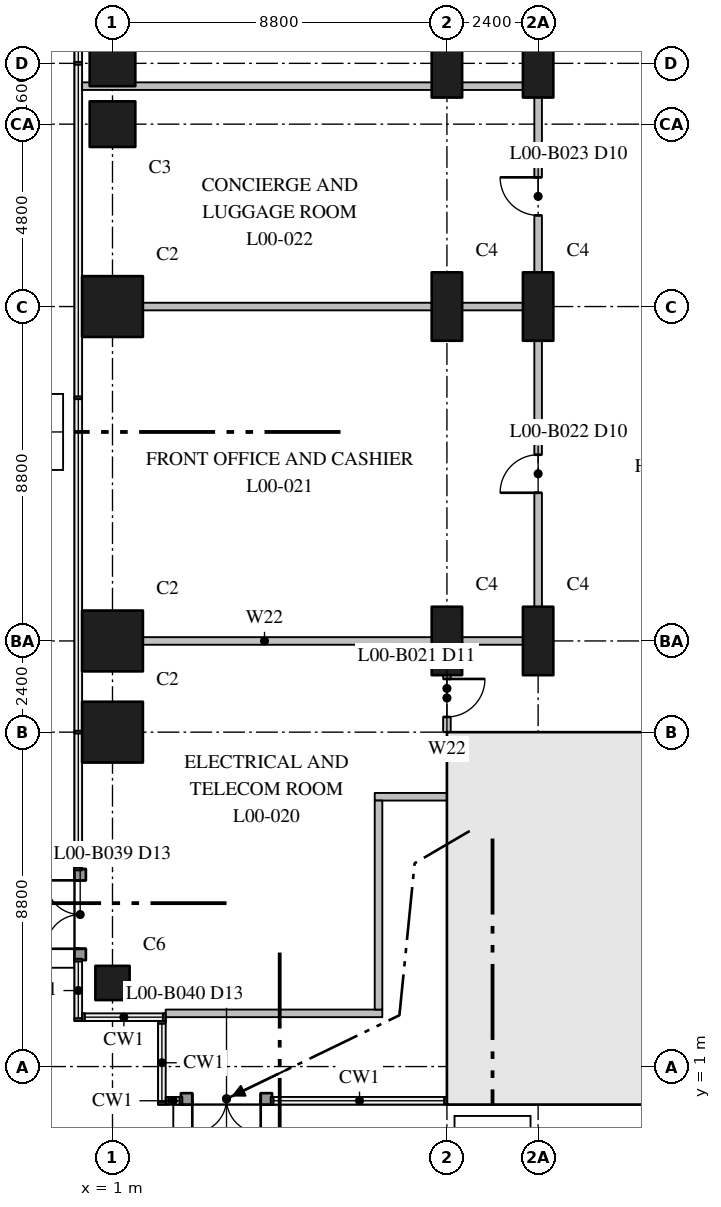
"""IFC4 building model, lengths in metres.
Left out: names, types, materials, properties, quantities, classifications, styles, units other than length and angle.
Written with IfcOpenShell. Run it as: python <this file> out.ifc"""

import sys

from ifc_helpers import new_model, si_unit, direction, frame, frame_2d, origin, origin_2d, place, context, subcontext, project, spatial, rectangle, extrude, element, fill, save


model = new_model("IFC4")
c1 = context("Model", 3, precision=1e-05, world=origin(), true_north=direction((0.0, 1.0)))
c2 = subcontext(c1, "Body", "Model", "MODEL_VIEW")
j1 = project(units=[si_unit("LENGTHUNIT", "METRE"), si_unit("PLANEANGLEUNIT", "RADIAN")], contexts=[c1])
p1 = place(None, origin())
s1 = spatial("IfcSite", under=j1, at=p1, CompositionType="ELEMENT")
p2 = place(p1, origin())
s2 = spatial("IfcBuilding", under=s1, at=p2, CompositionType="ELEMENT")
p3 = place(p2, origin())
s3 = spatial("IfcBuildingStorey", under=s2, at=p3, CompositionType="ELEMENT", Elevation=0.0)
p4 = place(p3, frame((1.0, 3.2, 0.0), z_axis=(0.0, 0.0, 1.0), x_axis=(1.0, 0.0, 0.0)))
e1 = element("IfcColumn", 1, at=p4, inside=s3, PredefinedType="COLUMN", context=c2, shape_type="SweptSolid", body=[
    extrude(rectangle(XDim=0.9, YDim=0.9, at=origin_2d()), origin(), (0.0, 0.0, 1.0), 7.5),
])
for number, where, z_axis, x_axis in (
    (2, (1.0, 9.8, 0.0), (0.0, 0.0, 1.0), (1.0, 0.0, 0.0)),
    (3, (1.0, 12.2, 0.0), (0.0, 0.0, 1.0), (1.0, 0.0, 0.0)),
    (4, (1.0, 21.0, 0.0), (0.0, 0.0, 1.0), (1.0, 0.0, 0.0)),
):
    element("IfcColumn", number, at=place(p3, frame(where, z_axis=z_axis, x_axis=x_axis)), inside=s3, PredefinedType="COLUMN", context=c2, shape_type="SweptSolid", body=[
        extrude(rectangle(XDim=1.6, YDim=1.6, at=origin_2d()), origin(), (0.0, 0.0, 1.0), 7.5),
    ])
for number, where, z_axis, x_axis in (
    (5, (1.0, 25.8, 0.0), (0.0, 0.0, 1.0), (1.0, 0.0, 0.0)),
    (6, (1.0, 27.4, 0.0), (0.0, 0.0, 1.0), (1.0, 0.0, 0.0)),
):
    element("IfcColumn", number, at=place(p3, frame(where, z_axis=z_axis, x_axis=x_axis)), inside=s3, PredefinedType="COLUMN", context=c2, shape_type="SweptSolid", body=[
        extrude(rectangle(XDim=1.2, YDim=1.2, at=origin_2d()), origin(), (0.0, 0.0, 1.0), 7.5),
    ])
for number, where, z_axis, x_axis in (
    (7, (9.8, 12.2, 0.0), (0.0, 0.0, 1.0), (0.0, 1.0, 0.0)),
    (8, (9.8, 21.0, 0.0), (0.0, 0.0, 1.0), (0.0, 1.0, 0.0)),
    (9, (9.8, 27.4, 0.0), (0.0, 0.0, 1.0), (0.0, 1.0, 0.0)),
    (10, (12.2, 12.2, 0.0), (0.0, 0.0, 1.0), (0.0, 1.0, 0.0)),
    (11, (12.2, 21.0, 0.0), (0.0, 0.0, 1.0), (0.0, 1.0, 0.0)),
    (12, (12.2, 27.4, 0.0), (0.0, 0.0, 1.0), (0.0, 1.0, 0.0)),
):
    element("IfcColumn", number, at=place(p3, frame(where, z_axis=z_axis, x_axis=x_axis)), inside=s3, PredefinedType="COLUMN", context=c2, shape_type="SweptSolid", body=[
        extrude(rectangle(XDim=1.8, YDim=0.8, at=origin_2d()), origin(), (0.0, 0.0, 1.0), 7.5),
    ])
p5 = place(p3, frame((9.8, 0.6, 0.0), z_axis=(0.0, 0.0, 1.0), x_axis=(1.0, 0.0, 0.0)))
e13 = element("IfcWall", 13, at=p5, inside=s3, PredefinedType="SHEAR", context=c2, shape_type="SweptSolid", body=[
    extrude(rectangle(XDim=35.2, YDim=1.2, at=frame_2d((17.6, 0.0))), origin(), (0.0, 0.0, 1.0), 7.5),
])
p6 = place(p3, frame((10.4, 1.2, 0.0), z_axis=(0.0, 0.0, 1.0), x_axis=(0.0, 1.0, 0.0)))
e14 = element("IfcWall", 14, at=p6, inside=s3, PredefinedType="SHEAR", context=c2, shape_type="SweptSolid", body=[
    extrude(rectangle(XDim=8.6, YDim=1.2, at=frame_2d((4.3, 0.0))), origin(), (0.0, 0.0, 1.0), 7.5),
])
p7 = place(p6, frame((5.4, 0.0, 0.0)))
e15 = element("IfcOpeningElement", 15, at=p7, cuts=e14, PredefinedType="OPENING", context=c2, shape_type="SweptSolid", body=[
    extrude(rectangle(XDim=1.2, YDim=2.1, at=frame_2d((0.6, 1.05))), frame((0.0, 0.61, 0.0), z_axis=(0.0, -1.0, 0.0), x_axis=(1.0, 0.0, 0.0)), (0.0, 0.0, 1.0), 1.22),
])
p8 = place(p3, frame((9.8, 9.6, 0.0), z_axis=(0.0, 0.0, 1.0), x_axis=(1.0, 0.0, 0.0)))
e16 = element("IfcWall", 16, at=p8, inside=s3, PredefinedType="SHEAR", context=c2, shape_type="SweptSolid", body=[
    extrude(rectangle(XDim=4.3, YDim=0.4, at=frame_2d((2.15, 0.0))), origin(), (0.0, 0.0, 1.0), 7.5),
])
p9 = place(p8, frame((2.05, 0.0, 0.0)))
e17 = element("IfcOpeningElement", 17, at=p9, cuts=e16, PredefinedType="OPENING", context=c2, shape_type="SweptSolid", body=[
    extrude(rectangle(XDim=1.2, YDim=2.1, at=frame_2d((0.6, 1.05))), frame((0.0, 0.21, 0.0), z_axis=(0.0, -1.0, 0.0), x_axis=(1.0, 0.0, 0.0)), (0.0, 0.0, 1.0), 0.42),
])
p10 = place(p3, frame((14.1, 9.6, 0.0), z_axis=(0.0, 0.0, 1.0), x_axis=(1.0, 0.0, 0.0)))
e18 = element("IfcWall", 18, at=p10, inside=s3, PredefinedType="SHEAR", context=c2, shape_type="SweptSolid", body=[
    extrude(rectangle(XDim=10.4, YDim=0.4, at=frame_2d((5.2, 0.0))), origin(), (0.0, 0.0, 1.0), 7.5),
])
p11 = place(p10, frame((0.85, 0.0, 0.0)))
e19 = element("IfcOpeningElement", 19, at=p11, cuts=e18, PredefinedType="OPENING", context=c2, shape_type="SweptSolid", body=[
    extrude(rectangle(XDim=0.9, YDim=2.1, at=frame_2d((0.45, 1.05))), frame((0.0, 0.21, 0.0), z_axis=(0.0, -1.0, 0.0), x_axis=(1.0, 0.0, 0.0)), (0.0, 0.0, 1.0), 0.42),
])
p12 = place(p10, frame((3.4, 0.0, 0.0)))
e20 = element("IfcOpeningElement", 20, at=p12, cuts=e18, PredefinedType="OPENING", context=c2, shape_type="SweptSolid", body=[
    extrude(rectangle(XDim=1.0, YDim=2.1, at=frame_2d((0.5, 1.05))), frame((0.0, 0.21, 0.0), z_axis=(0.0, -1.0, 0.0), x_axis=(1.0, 0.0, 0.0)), (0.0, 0.0, 1.0), 0.42),
])
p13 = place(p3, frame((14.1, 3.8, 0.0), z_axis=(0.0, 0.0, 1.0), x_axis=(1.0, 0.0, 0.0)))
e21 = element("IfcWall", 21, at=p13, inside=s3, PredefinedType="SHEAR", context=c2, shape_type="SweptSolid", body=[
    extrude(rectangle(XDim=26.6, YDim=0.4, at=frame_2d((13.3, 0.0))), origin(), (0.0, 0.0, 1.0), 7.5),
])
p14 = place(p13, frame((0.95, 0.0, 0.0)))
e22 = element("IfcOpeningElement", 22, at=p14, cuts=e21, PredefinedType="OPENING", context=c2, shape_type="SweptSolid", body=[
    extrude(rectangle(XDim=1.3, YDim=2.1, at=frame_2d((0.65, 1.05))), frame((0.0, 0.21, 0.0), z_axis=(0.0, -1.0, 0.0), x_axis=(1.0, 0.0, 0.0)), (0.0, 0.0, 1.0), 0.42),
])
p15 = place(p13, frame((3.95, 0.0, 0.0)))
e23 = element("IfcOpeningElement", 23, at=p15, cuts=e21, PredefinedType="OPENING", context=c2, shape_type="SweptSolid", body=[
    extrude(rectangle(XDim=1.1, YDim=2.1, at=frame_2d((0.55, 1.05))), frame((0.0, 0.21, 0.0), z_axis=(0.0, -1.0, 0.0), x_axis=(1.0, 0.0, 0.0)), (0.0, 0.0, 1.0), 0.42),
])
p16 = place(p13, frame((6.55, 0.0, 0.0)))
e24 = element("IfcOpeningElement", 24, at=p16, cuts=e21, PredefinedType="OPENING", context=c2, shape_type="SweptSolid", body=[
    extrude(rectangle(XDim=1.1, YDim=2.1, at=frame_2d((0.55, 1.05))), frame((0.0, 0.21, 0.0), z_axis=(0.0, -1.0, 0.0), x_axis=(1.0, 0.0, 0.0)), (0.0, 0.0, 1.0), 0.42),
])
p17 = place(p13, frame((9.15, 0.0, 0.0)))
e25 = element("IfcOpeningElement", 25, at=p17, cuts=e21, PredefinedType="OPENING", context=c2, shape_type="SweptSolid", body=[
    extrude(rectangle(XDim=1.1, YDim=2.1, at=frame_2d((0.55, 1.05))), frame((0.0, 0.21, 0.0), z_axis=(0.0, -1.0, 0.0), x_axis=(1.0, 0.0, 0.0)), (0.0, 0.0, 1.0), 0.42),
])
p18 = place(p13, frame((11.75, 0.0, 0.0)))
e26 = element("IfcOpeningElement", 26, at=p18, cuts=e21, PredefinedType="OPENING", context=c2, shape_type="SweptSolid", body=[
    extrude(rectangle(XDim=1.1, YDim=2.1, at=frame_2d((0.55, 1.05))), frame((0.0, 0.21, 0.0), z_axis=(0.0, -1.0, 0.0), x_axis=(1.0, 0.0, 0.0)), (0.0, 0.0, 1.0), 0.42),
])
p19 = place(p13, frame((14.35, 0.0, 0.0)))
e27 = element("IfcOpeningElement", 27, at=p19, cuts=e21, PredefinedType="OPENING", context=c2, shape_type="SweptSolid", body=[
    extrude(rectangle(XDim=1.1, YDim=2.1, at=frame_2d((0.55, 1.05))), frame((0.0, 0.21, 0.0), z_axis=(0.0, -1.0, 0.0), x_axis=(1.0, 0.0, 0.0)), (0.0, 0.0, 1.0), 0.42),
])
p20 = place(p13, frame((16.95, 0.0, 0.0)))
e28 = element("IfcOpeningElement", 28, at=p20, cuts=e21, PredefinedType="OPENING", context=c2, shape_type="SweptSolid", body=[
    extrude(rectangle(XDim=1.1, YDim=2.1, at=frame_2d((0.55, 1.05))), frame((0.0, 0.21, 0.0), z_axis=(0.0, -1.0, 0.0), x_axis=(1.0, 0.0, 0.0)), (0.0, 0.0, 1.0), 0.42),
])
p21 = place(p13, frame((19.55, 0.0, 0.0)))
e29 = element("IfcOpeningElement", 29, at=p21, cuts=e21, PredefinedType="OPENING", context=c2, shape_type="SweptSolid", body=[
    extrude(rectangle(XDim=1.1, YDim=2.1, at=frame_2d((0.55, 1.05))), frame((0.0, 0.21, 0.0), z_axis=(0.0, -1.0, 0.0), x_axis=(1.0, 0.0, 0.0)), (0.0, 0.0, 1.0), 0.42),
])
p22 = place(p13, frame((22.15, 0.0, 0.0)))
e30 = element("IfcOpeningElement", 30, at=p22, cuts=e21, PredefinedType="OPENING", context=c2, shape_type="SweptSolid", body=[
    extrude(rectangle(XDim=1.1, YDim=2.1, at=frame_2d((0.55, 1.05))), frame((0.0, 0.21, 0.0), z_axis=(0.0, -1.0, 0.0), x_axis=(1.0, 0.0, 0.0)), (0.0, 0.0, 1.0), 0.42),
])
p23 = place(p13, frame((24.75, 0.0, 0.0)))
e31 = element("IfcOpeningElement", 31, at=p23, cuts=e21, PredefinedType="OPENING", context=c2, shape_type="SweptSolid", body=[
    extrude(rectangle(XDim=1.1, YDim=2.1, at=frame_2d((0.55, 1.05))), frame((0.0, 0.21, 0.0), z_axis=(0.0, -1.0, 0.0), x_axis=(1.0, 0.0, 0.0)), (0.0, 0.0, 1.0), 0.42),
])
p24 = place(p3, frame((14.1, 6.8, 0.0), z_axis=(0.0, 0.0, 1.0), x_axis=(1.0, 0.0, 0.0)))
e32 = element("IfcWall", 32, at=p24, inside=s3, PredefinedType="SHEAR", context=c2, shape_type="SweptSolid", body=[
    extrude(rectangle(XDim=26.6, YDim=0.4, at=frame_2d((13.3, 0.0))), origin(), (0.0, 0.0, 1.0), 7.5),
])
p25 = place(p24, frame((10.8, 0.0, 0.0)))
e33 = element("IfcOpeningElement", 33, at=p25, cuts=e32, PredefinedType="OPENING", context=c2, shape_type="SweptSolid", body=[
    extrude(rectangle(XDim=1.8, YDim=2.1, at=frame_2d((0.9, 1.05))), frame((0.0, 0.21, 0.0), z_axis=(0.0, -1.0, 0.0), x_axis=(1.0, 0.0, 0.0)), (0.0, 0.0, 1.0), 0.42),
])
p26 = place(p24, frame((24.35, 0.0, 0.0)))
e34 = element("IfcOpeningElement", 34, at=p26, cuts=e32, PredefinedType="OPENING", context=c2, shape_type="SweptSolid", body=[
    extrude(rectangle(XDim=1.3, YDim=2.1, at=frame_2d((0.65, 1.05))), frame((0.0, 0.21, 0.0), z_axis=(0.0, -1.0, 0.0), x_axis=(1.0, 0.0, 0.0)), (0.0, 0.0, 1.0), 0.42),
])
p27 = place(p3, frame((14.1, 1.2, 0.0), z_axis=(0.0, 0.0, 1.0), x_axis=(0.0, 1.0, 0.0)))
e35 = element("IfcWall", 35, at=p27, inside=s3, PredefinedType="SHEAR", context=c2, shape_type="SweptSolid", body=[
    extrude(rectangle(XDim=8.4, YDim=0.4, at=frame_2d((4.2, 0.0))), origin(), (0.0, 0.0, 1.0), 7.5),
])
p28 = place(p27, frame((4.45, 0.0, 0.0)))
e36 = element("IfcOpeningElement", 36, at=p28, cuts=e35, PredefinedType="OPENING", context=c2, shape_type="SweptSolid", body=[
    extrude(rectangle(XDim=0.9, YDim=2.1, at=frame_2d((0.45, 1.05))), frame((0.0, 0.21, 0.0), z_axis=(0.0, -1.0, 0.0), x_axis=(1.0, 0.0, 0.0)), (0.0, 0.0, 1.0), 0.42),
])
p29 = place(p3, frame((2.4, 2.4, 0.0), z_axis=(0.0, 0.0, 1.0), x_axis=(1.0, 0.0, 0.0)))
e37 = element("IfcWall", 37, at=p29, inside=s3, PredefinedType="PARTITIONING", context=c2, shape_type="SweptSolid", body=[
    extrude(rectangle(XDim=5.7, YDim=0.2, at=frame_2d((2.85, 0.0))), origin(), (0.0, 0.0, 1.0), 7.1),
])
p30 = place(p3, frame((7.9, 8.1, 0.0), z_axis=(0.0, 0.0, 1.0), x_axis=(1.0, 0.0, 0.0)))
e38 = element("IfcWall", 38, at=p30, inside=s3, PredefinedType="PARTITIONING", context=c2, shape_type="SweptSolid", body=[
    extrude(rectangle(XDim=1.9, YDim=0.2, at=frame_2d((0.95, 0.0))), origin(), (0.0, 0.0, 1.0), 7.1),
])
p31 = place(p3, frame((0.2, 12.2, 0.0), z_axis=(0.0, 0.0, 1.0), x_axis=(1.0, 0.0, 0.0)))
e39 = element("IfcWall", 39, at=p31, inside=s3, PredefinedType="PARTITIONING", context=c2, shape_type="SweptSolid", body=[
    extrude(rectangle(XDim=9.6, YDim=0.2, at=frame_2d((4.8, 0.0))), origin(), (0.0, 0.0, 1.0), 7.1),
])
p32 = place(p3, frame((9.8, 12.2, 0.0), z_axis=(0.0, 0.0, 1.0), x_axis=(1.0, 0.0, 0.0)))
e40 = element("IfcWall", 40, at=p32, inside=s3, PredefinedType="PARTITIONING", context=c2, shape_type="SweptSolid", body=[
    extrude(rectangle(XDim=2.5, YDim=0.2, at=frame_2d((1.25, 0.0))), origin(), (0.0, 0.0, 1.0), 7.1),
])
p33 = place(p3, frame((0.2, 26.8, 0.0), z_axis=(0.0, 0.0, 1.0), x_axis=(1.0, 0.0, 0.0)))
e41 = element("IfcWall", 41, at=p33, inside=s3, PredefinedType="PARTITIONING", context=c2, shape_type="SweptSolid", body=[
    extrude(rectangle(XDim=9.6, YDim=0.2, at=frame_2d((4.8, 0.0))), origin(), (0.0, 0.0, 1.0), 7.1),
])
p34 = place(p3, frame((9.8, 26.8, 0.0), z_axis=(0.0, 0.0, 1.0), x_axis=(1.0, 0.0, 0.0)))
e42 = element("IfcWall", 42, at=p34, inside=s3, PredefinedType="PARTITIONING", context=c2, shape_type="SweptSolid", body=[
    extrude(rectangle(XDim=2.5, YDim=0.2, at=frame_2d((1.25, 0.0))), origin(), (0.0, 0.0, 1.0), 7.1),
])
p35 = place(p3, frame((0.2, 21.0, 0.0), z_axis=(0.0, 0.0, 1.0), x_axis=(1.0, 0.0, 0.0)))
e43 = element("IfcWall", 43, at=p35, inside=s3, PredefinedType="PARTITIONING", context=c2, shape_type="SweptSolid", body=[
    extrude(rectangle(XDim=11.9, YDim=0.2, at=frame_2d((5.95, 0.0))), origin(), (0.0, 0.0, 1.0), 7.1),
])
p36 = place(p3, frame((8.0, 2.5, 0.0), z_axis=(0.0, 0.0, 1.0), x_axis=(0.0, 1.0, 0.0)))
e44 = element("IfcWall", 44, at=p36, inside=s3, PredefinedType="PARTITIONING", context=c2, shape_type="SweptSolid", body=[
    extrude(rectangle(XDim=5.5, YDim=0.2, at=frame_2d((2.75, 0.0))), origin(), (0.0, 0.0, 1.0), 7.1),
])
p37 = place(p3, frame((9.8, 9.8, 0.0), z_axis=(0.0, 0.0, 1.0), x_axis=(0.0, 1.0, 0.0)))
e45 = element("IfcWall", 45, at=p37, inside=s3, PredefinedType="PARTITIONING", context=c2, shape_type="SweptSolid", body=[
    extrude(rectangle(XDim=2.3, YDim=0.2, at=frame_2d((1.15, 0.0))), origin(), (0.0, 0.0, 1.0), 7.1),
])
p38 = place(p37, frame((0.4, 0.0, 0.0)))
e46 = element("IfcOpeningElement", 46, at=p38, cuts=e45, PredefinedType="OPENING", context=c2, shape_type="SweptSolid", body=[
    extrude(rectangle(XDim=1.0, YDim=2.1, at=frame_2d((0.5, 1.05))), frame((0.0, 0.11, 0.0), z_axis=(0.0, -1.0, 0.0), x_axis=(1.0, 0.0, 0.0)), (0.0, 0.0, 1.0), 0.22),
])
p39 = place(p3, frame((9.8, 26.9, 0.0), z_axis=(0.0, 0.0, 1.0), x_axis=(0.0, 1.0, 0.0)))
e47 = element("IfcWall", 47, at=p39, inside=s3, PredefinedType="PARTITIONING", context=c2, shape_type="SweptSolid", body=[
    extrude(rectangle(XDim=30.9, YDim=0.2, at=frame_2d((15.45, 0.0))), origin(), (0.0, 0.0, 1.0), 7.1),
])
p40 = place(p39, frame((4.1, 0.0, 0.0)))
e48 = element("IfcOpeningElement", 48, at=p40, cuts=e47, PredefinedType="OPENING", context=c2, shape_type="SweptSolid", body=[
    extrude(rectangle(XDim=1.0, YDim=2.1, at=frame_2d((0.5, 1.05))), frame((0.0, 0.11, 0.0), z_axis=(0.0, -1.0, 0.0), x_axis=(1.0, 0.0, 0.0)), (0.0, 0.0, 1.0), 0.22),
])
p41 = place(p39, frame((13.2, 0.0, 0.0)))
e49 = element("IfcOpeningElement", 49, at=p41, cuts=e47, PredefinedType="OPENING", context=c2, shape_type="SweptSolid", body=[
    extrude(rectangle(XDim=1.0, YDim=2.1, at=frame_2d((0.5, 1.05))), frame((0.0, 0.11, 0.0), z_axis=(0.0, -1.0, 0.0), x_axis=(1.0, 0.0, 0.0)), (0.0, 0.0, 1.0), 0.22),
])
p42 = place(p39, frame((22.0, 0.0, 0.0)))
e50 = element("IfcOpeningElement", 50, at=p42, cuts=e47, PredefinedType="OPENING", context=c2, shape_type="SweptSolid", body=[
    extrude(rectangle(XDim=1.0, YDim=2.1, at=frame_2d((0.5, 1.05))), frame((0.0, 0.11, 0.0), z_axis=(0.0, -1.0, 0.0), x_axis=(1.0, 0.0, 0.0)), (0.0, 0.0, 1.0), 0.22),
])
p43 = place(p3, frame((12.2, 12.3, 0.0), z_axis=(0.0, 0.0, 1.0), x_axis=(0.0, 1.0, 0.0)))
e51 = element("IfcWall", 51, at=p43, inside=s3, PredefinedType="PARTITIONING", context=c2, shape_type="SweptSolid", body=[
    extrude(rectangle(XDim=14.4, YDim=0.2, at=frame_2d((7.2, 0.0))), origin(), (0.0, 0.0, 1.0), 7.1),
])
p44 = place(p43, frame((3.8, 0.0, 0.0)))
e52 = element("IfcOpeningElement", 52, at=p44, cuts=e51, PredefinedType="OPENING", context=c2, shape_type="SweptSolid", body=[
    extrude(rectangle(XDim=1.0, YDim=2.1, at=frame_2d((0.5, 1.05))), frame((0.0, 0.11, 0.0), z_axis=(0.0, -1.0, 0.0), x_axis=(1.0, 0.0, 0.0)), (0.0, 0.0, 1.0), 0.22),
])
p45 = place(p43, frame((11.1, 0.0, 0.0)))
e53 = element("IfcOpeningElement", 53, at=p45, cuts=e51, PredefinedType="OPENING", context=c2, shape_type="SweptSolid", body=[
    extrude(rectangle(XDim=1.0, YDim=2.1, at=frame_2d((0.5, 1.05))), frame((0.0, 0.11, 0.0), z_axis=(0.0, -1.0, 0.0), x_axis=(1.0, 0.0, 0.0)), (0.0, 0.0, 1.0), 0.22),
])
p46 = place(p3, frame((0.15, 3.8, 0.0), z_axis=(0.0, 0.0, 1.0), x_axis=(0.0, 1.0, 0.0)))
e54 = element("IfcWall", 54, at=p46, inside=s3, PredefinedType="STANDARD", context=c2, shape_type="SweptSolid", body=[
    extrude(rectangle(XDim=2.4, YDim=0.3, at=frame_2d((1.2, 0.0))), origin(), (0.0, 0.0, 1.0), 7.1),
])
p47 = place(p46, frame((0.3, 0.0, 0.0)))
e55 = element("IfcOpeningElement", 55, at=p47, cuts=e54, PredefinedType="OPENING", context=c2, shape_type="SweptSolid", body=[
    extrude(rectangle(XDim=1.8, YDim=2.1, at=frame_2d((0.9, 1.05))), frame((0.0, 0.16, 0.0), z_axis=(0.0, -1.0, 0.0), x_axis=(1.0, 0.0, 0.0)), (0.0, 0.0, 1.0), 0.32),
])
p48 = place(p3, frame((5.2, 0.15, 0.0), z_axis=(0.0, 0.0, 1.0), x_axis=(-1.0, 0.0, 0.0)))
e56 = element("IfcWall", 56, at=p48, inside=s3, PredefinedType="STANDARD", context=c2, shape_type="SweptSolid", body=[
    extrude(rectangle(XDim=2.4, YDim=0.3, at=frame_2d((1.2, 0.0))), origin(), (0.0, 0.0, 1.0), 7.1),
])
p49 = place(p48, frame((0.3, 0.0, 0.0)))
e57 = element("IfcOpeningElement", 57, at=p49, cuts=e56, PredefinedType="OPENING", context=c2, shape_type="SweptSolid", body=[
    extrude(rectangle(XDim=1.8, YDim=2.1, at=frame_2d((0.9, 1.05))), frame((0.0, 0.16, 0.0), z_axis=(0.0, -1.0, 0.0), x_axis=(1.0, 0.0, 0.0)), (0.0, 0.0, 1.0), 0.32),
])
p50 = place(p9, origin())
e58 = element("IfcDoor", 58, at=p50, inside=s3, OperationType="SINGLE_SWING_RIGHT", PredefinedType="DOOR", context=c2, shape_type="SweptSolid", body=[
    extrude(rectangle(XDim=1.2, YDim=2.1, at=frame_2d((0.6, 1.05))), frame((0.0, 0.025, 0.0), z_axis=(0.0, -1.0, 0.0), x_axis=(1.0, 0.0, 0.0)), (0.0, 0.0, 1.0), 0.05),
])
fill(e17, e58)
p51 = place(p7, origin())
e59 = element("IfcDoor", 59, at=p51, inside=s3, OperationType="SINGLE_SWING_RIGHT", PredefinedType="DOOR", context=c2, shape_type="SweptSolid", body=[
    extrude(rectangle(XDim=1.2, YDim=2.1, at=frame_2d((0.6, 1.05))), frame((0.0, 0.025, 0.0), z_axis=(0.0, -1.0, 0.0), x_axis=(1.0, 0.0, 0.0)), (0.0, 0.0, 1.0), 0.05),
])
fill(e15, e59)
p52 = place(p28, frame((0.9, 0.0, 0.0), z_axis=(0.0, 0.0, 1.0), x_axis=(-1.0, 0.0, 0.0)))
e60 = element("IfcDoor", 60, at=p52, inside=s3, OperationType="SINGLE_SWING_LEFT", PredefinedType="DOOR", context=c2, shape_type="SweptSolid", body=[
    extrude(rectangle(XDim=0.9, YDim=2.1, at=frame_2d((0.45, 1.05))), frame((0.0, 0.025, 0.0), z_axis=(0.0, -1.0, 0.0), x_axis=(1.0, 0.0, 0.0)), (0.0, 0.0, 1.0), 0.05),
])
fill(e36, e60)
p53 = place(p38, frame((1.0, 0.0, 0.0), z_axis=(0.0, 0.0, 1.0), x_axis=(-1.0, 0.0, 0.0)))
e61 = element("IfcDoor", 61, at=p53, inside=s3, OperationType="SINGLE_SWING_RIGHT", PredefinedType="DOOR", context=c2, shape_type="SweptSolid", body=[
    extrude(rectangle(XDim=1.0, YDim=2.1, at=frame_2d((0.5, 1.05))), frame((0.0, 0.025, 0.0), z_axis=(0.0, -1.0, 0.0), x_axis=(1.0, 0.0, 0.0)), (0.0, 0.0, 1.0), 0.05),
])
fill(e46, e61)
p54 = place(p44, origin())
e62 = element("IfcDoor", 62, at=p54, inside=s3, OperationType="SINGLE_SWING_LEFT", PredefinedType="DOOR", context=c2, shape_type="SweptSolid", body=[
    extrude(rectangle(XDim=1.0, YDim=2.1, at=frame_2d((0.5, 1.05))), frame((0.0, 0.025, 0.0), z_axis=(0.0, -1.0, 0.0), x_axis=(1.0, 0.0, 0.0)), (0.0, 0.0, 1.0), 0.05),
])
fill(e52, e62)
p55 = place(p45, origin())
e63 = element("IfcDoor", 63, at=p55, inside=s3, OperationType="SINGLE_SWING_RIGHT", PredefinedType="DOOR", context=c2, shape_type="SweptSolid", body=[
    extrude(rectangle(XDim=1.0, YDim=2.1, at=frame_2d((0.5, 1.05))), frame((0.0, 0.025, 0.0), z_axis=(0.0, -1.0, 0.0), x_axis=(1.0, 0.0, 0.0)), (0.0, 0.0, 1.0), 0.05),
])
fill(e53, e63)
p56 = place(p47, origin())
e64 = element("IfcDoor", 64, at=p56, inside=s3, OperationType="DOUBLE_DOOR_SINGLE_SWING", PredefinedType="DOOR", context=c2, shape_type="SweptSolid", body=[
    extrude(rectangle(XDim=1.8, YDim=2.1, at=frame_2d((0.9, 1.05))), frame((0.0, 0.025, 0.0), z_axis=(0.0, -1.0, 0.0), x_axis=(1.0, 0.0, 0.0)), (0.0, 0.0, 1.0), 0.05),
])
fill(e55, e64)
p57 = place(p49, origin())
e65 = element("IfcDoor", 65, at=p57, inside=s3, OperationType="DOUBLE_DOOR_SINGLE_SWING", PredefinedType="DOOR", context=c2, shape_type="SweptSolid", body=[
    extrude(rectangle(XDim=1.8, YDim=2.1, at=frame_2d((0.9, 1.05))), frame((0.0, 0.025, 0.0), z_axis=(0.0, -1.0, 0.0), x_axis=(1.0, 0.0, 0.0)), (0.0, 0.0, 1.0), 0.05),
])
fill(e57, e65)
save(model, sys.argv[1])
